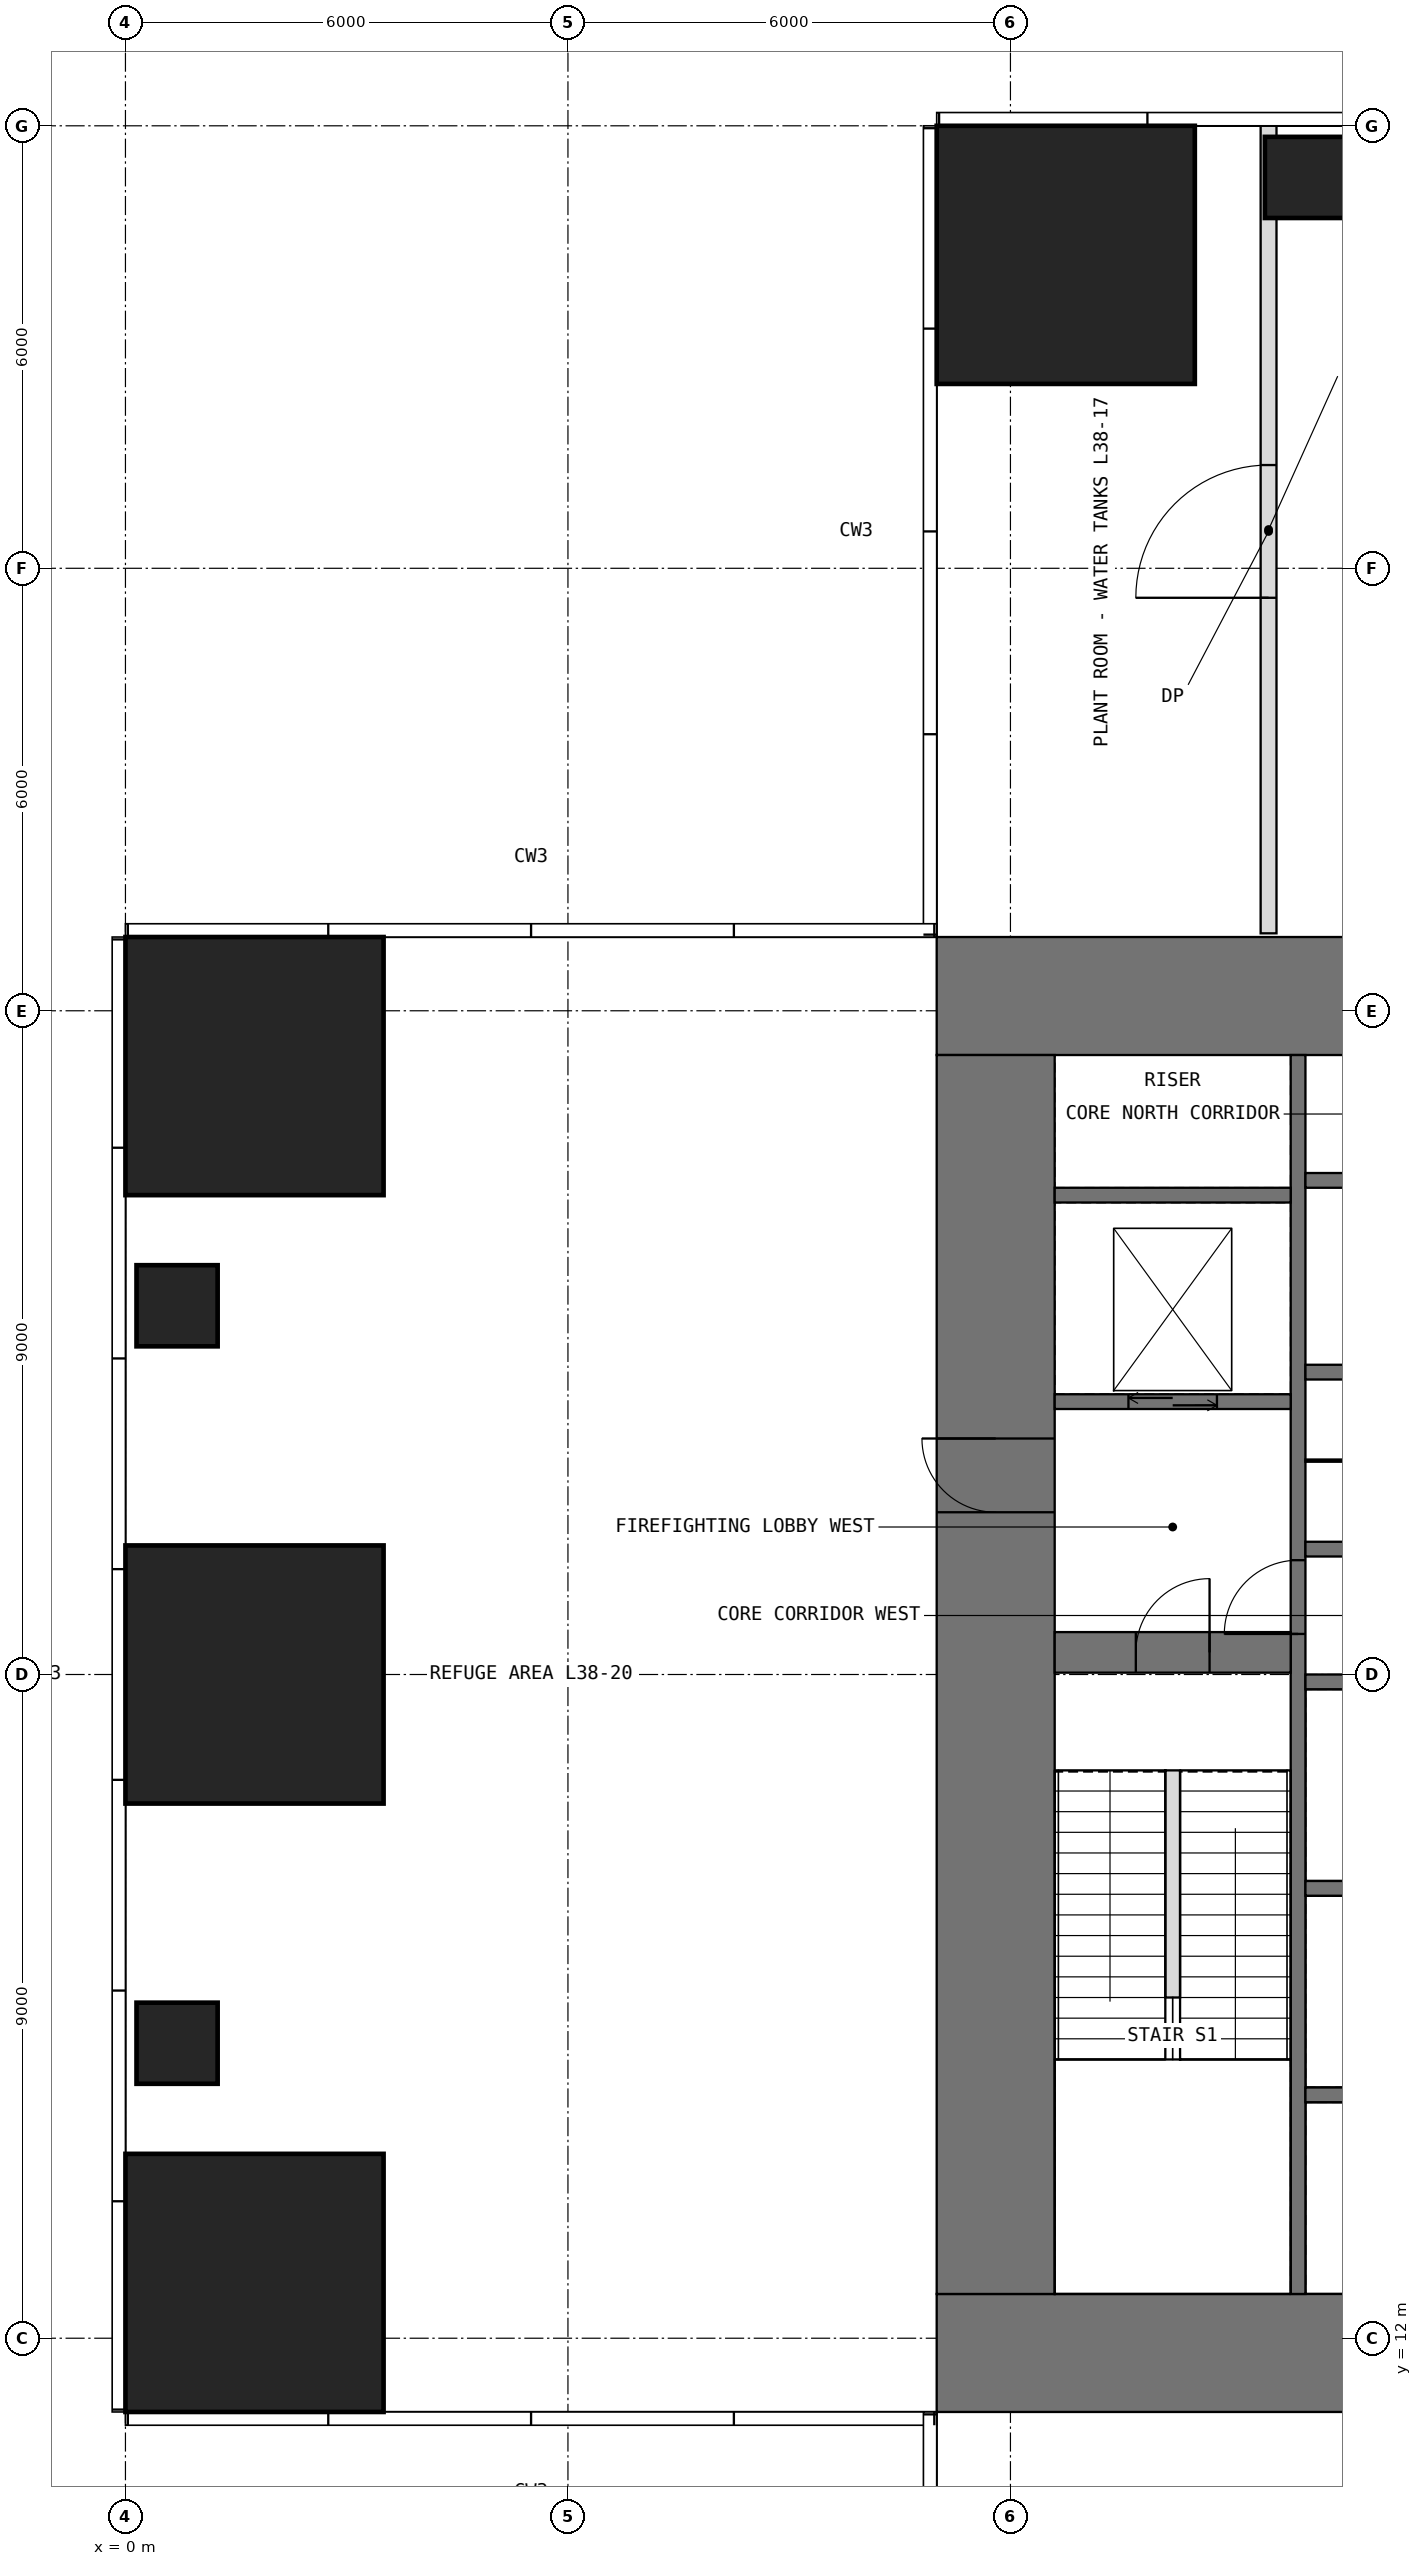
"""IFC4 building model, lengths in metres.
Left out: names, types, materials, properties, quantities, classifications, styles, units other than length and angle.
Written with IfcOpenShell. Run it as: python <this file> out.ifc"""

import sys

from ifc_helpers import new_model, si_unit, direction, frame, frame_2d, origin, origin_2d, place, context, subcontext, project, spatial, rectangle, extrude, element, fill, save


model = new_model("IFC4")
c1 = context("Model", 3, precision=1e-05, world=origin(), true_north=direction((0.0, 1.0)))
c2 = subcontext(c1, "Body", "Model", "MODEL_VIEW")
j1 = project(units=[si_unit("LENGTHUNIT", "METRE"), si_unit("PLANEANGLEUNIT", "RADIAN")], contexts=[c1])
p1 = place(None, origin())
s1 = spatial("IfcSite", under=j1, at=p1, CompositionType="ELEMENT")
p2 = place(p1, origin())
s2 = spatial("IfcBuilding", under=s1, at=p2, CompositionType="ELEMENT")
p3 = place(p2, frame((0.0, 0.0, 160.5)))
s3 = spatial("IfcBuildingStorey", under=s2, at=p3, CompositionType="ELEMENT", Elevation=160.5)
p4 = place(p3, frame((1.75, 12.75, 0.0), z_axis=(0.0, 0.0, 1.0), x_axis=(1.0, 0.0, 0.0)))
e1 = element("IfcColumn", 1, at=p4, inside=s3, PredefinedType="COLUMN", context=c2, shape_type="SweptSolid", body=[
    extrude(rectangle(XDim=3.5, YDim=3.5, at=origin_2d()), origin(), (0.0, 0.0, 1.0), 5.0),
])
p5 = place(p3, frame((0.7, 16.0, 0.0), z_axis=(0.0, 0.0, 1.0), x_axis=(1.0, 0.0, 0.0)))
e2 = element("IfcColumn", 2, at=p5, inside=s3, PredefinedType="COLUMN", context=c2, shape_type="SweptSolid", body=[
    extrude(rectangle(XDim=1.1, YDim=1.1, at=origin_2d()), origin(), (0.0, 0.0, 1.0), 5.0),
])
p6 = place(p3, frame((1.75, 21.0, 0.0), z_axis=(0.0, 0.0, 1.0), x_axis=(1.0, 0.0, 0.0)))
e3 = element("IfcColumn", 3, at=p6, inside=s3, PredefinedType="COLUMN", context=c2, shape_type="SweptSolid", body=[
    extrude(rectangle(XDim=3.5, YDim=3.5, at=origin_2d()), origin(), (0.0, 0.0, 1.0), 5.0),
])
p7 = place(p3, frame((0.7, 26.0, 0.0), z_axis=(0.0, 0.0, 1.0), x_axis=(1.0, 0.0, 0.0)))
e4 = element("IfcColumn", 4, at=p7, inside=s3, PredefinedType="COLUMN", context=c2, shape_type="SweptSolid", body=[
    extrude(rectangle(XDim=1.1, YDim=1.1, at=origin_2d()), origin(), (0.0, 0.0, 1.0), 5.0),
])
for number, where, z_axis, x_axis in (
    (5, (1.75, 29.25, 0.0), (0.0, 0.0, 1.0), (1.0, 0.0, 0.0)),
    (6, (12.75, 40.25, 0.0), (0.0, 0.0, 1.0), (1.0, 0.0, 0.0)),
):
    element("IfcColumn", number, at=place(p3, frame(where, z_axis=z_axis, x_axis=x_axis)), inside=s3, PredefinedType="COLUMN", context=c2, shape_type="SweptSolid", body=[
        extrude(rectangle(XDim=3.5, YDim=3.5, at=origin_2d()), origin(), (0.0, 0.0, 1.0), 5.0),
    ])
p8 = place(p3, frame((16.0, 41.3, 0.0), z_axis=(0.0, 0.0, 1.0), x_axis=(1.0, 0.0, 0.0)))
e7 = element("IfcColumn", 7, at=p8, inside=s3, PredefinedType="COLUMN", context=c2, shape_type="SweptSolid", body=[
    extrude(rectangle(XDim=1.1, YDim=1.1, at=origin_2d()), origin(), (0.0, 0.0, 1.0), 5.0),
])
p9 = place(p3, frame((11.0, 11.8, -0.25), z_axis=(0.0, 0.0, 1.0), x_axis=(1.0, 0.0, 0.0)))
e8 = element("IfcWall", 8, at=p9, inside=s3, PredefinedType="SHEAR", context=c2, shape_type="SweptSolid", body=[
    extrude(rectangle(XDim=20.0, YDim=1.6, at=frame_2d((10.0, 0.0))), origin(), (0.0, 0.0, 1.0), 5.2),
])
p10 = place(p9, frame((12.925, 0.0, 0.25)))
e9 = element("IfcOpeningElement", 9, at=p10, cuts=e8, PredefinedType="OPENING", context=c2, shape_type="SweptSolid", body=[
    extrude(rectangle(XDim=0.95, YDim=2.4, at=frame_2d((0.475, 1.2))), frame((0.0, 0.81, 0.0), z_axis=(0.0, -1.0, 0.0), x_axis=(1.0, 0.0, 0.0)), (0.0, 0.0, 1.0), 1.62),
])
p11 = place(p3, frame((11.0, 30.2, -0.25), z_axis=(0.0, 0.0, 1.0), x_axis=(1.0, 0.0, 0.0)))
e10 = element("IfcWall", 10, at=p11, inside=s3, PredefinedType="SHEAR", context=c2, shape_type="SweptSolid", body=[
    extrude(rectangle(XDim=20.0, YDim=1.6, at=frame_2d((10.0, 0.0))), origin(), (0.0, 0.0, 1.0), 5.2),
])
p12 = place(p11, frame((6.125, 0.0, 0.25)))
e11 = element("IfcOpeningElement", 11, at=p12, cuts=e10, PredefinedType="OPENING", context=c2, shape_type="SweptSolid", body=[
    extrude(rectangle(XDim=0.95, YDim=2.4, at=frame_2d((0.475, 1.2))), frame((0.0, 0.81, 0.0), z_axis=(0.0, -1.0, 0.0), x_axis=(1.0, 0.0, 0.0)), (0.0, 0.0, 1.0), 1.62),
])
p13 = place(p3, frame((11.8, 12.6, -0.25), z_axis=(0.0, 0.0, 1.0), x_axis=(0.0, 1.0, 0.0)))
e12 = element("IfcWall", 12, at=p13, inside=s3, PredefinedType="SHEAR", context=c2, shape_type="SweptSolid", body=[
    extrude(rectangle(XDim=16.8, YDim=1.6, at=frame_2d((8.4, 0.0))), origin(), (0.0, 0.0, 1.0), 5.2),
])
p14 = place(p13, frame((10.6, 0.0, 0.25)))
e13 = element("IfcOpeningElement", 13, at=p14, cuts=e12, PredefinedType="OPENING", context=c2, shape_type="SweptSolid", body=[
    extrude(rectangle(XDim=1.0, YDim=2.2, at=frame_2d((0.5, 1.1))), frame((0.0, 0.81, 0.0), z_axis=(0.0, -1.0, 0.0), x_axis=(1.0, 0.0, 0.0)), (0.0, 0.0, 1.0), 1.62),
])
p15 = place(p3, frame((15.9, 12.6, -0.25), z_axis=(0.0, 0.0, 1.0), x_axis=(0.0, 1.0, 0.0)))
e14 = element("IfcWall", 14, at=p15, inside=s3, PredefinedType="SHEAR", context=c2, shape_type="SweptSolid", body=[
    extrude(rectangle(XDim=16.8, YDim=0.2, at=frame_2d((8.4, 0.0))), origin(), (0.0, 0.0, 1.0), 5.2),
])
p16 = place(p15, frame((8.95, 0.0, 0.25)))
e15 = element("IfcOpeningElement", 15, at=p16, cuts=e14, PredefinedType="OPENING", context=c2, shape_type="SweptSolid", body=[
    extrude(rectangle(XDim=1.0, YDim=2.2, at=frame_2d((0.5, 1.1))), frame((0.0, 0.11, 0.0), z_axis=(0.0, -1.0, 0.0), x_axis=(1.0, 0.0, 0.0)), (0.0, 0.0, 1.0), 0.22),
])
p17 = place(p3, frame((12.6, 21.3, -0.25), z_axis=(0.0, 0.0, 1.0), x_axis=(1.0, 0.0, 0.0)))
e16 = element("IfcWall", 16, at=p17, inside=s3, PredefinedType="SHEAR", context=c2, shape_type="SweptSolid", body=[
    extrude(rectangle(XDim=3.2, YDim=0.55, at=frame_2d((1.6, 0.0))), origin(), (0.0, 0.0, 1.0), 5.2),
])
p18 = place(p17, frame((1.1, 0.0, 0.25)))
e17 = element("IfcOpeningElement", 17, at=p18, cuts=e16, PredefinedType="OPENING", context=c2, shape_type="SweptSolid", body=[
    extrude(rectangle(XDim=1.0, YDim=2.2, at=frame_2d((0.5, 1.1))), frame((0.0, 0.285, 0.0), z_axis=(0.0, -1.0, 0.0), x_axis=(1.0, 0.0, 0.0)), (0.0, 0.0, 1.0), 0.57),
])
p19 = place(p3, frame((12.6, 24.7, -0.25), z_axis=(0.0, 0.0, 1.0), x_axis=(1.0, 0.0, 0.0)))
e18 = element("IfcWall", 18, at=p19, inside=s3, PredefinedType="SHEAR", context=c2, shape_type="SweptSolid", body=[
    extrude(rectangle(XDim=3.2, YDim=0.2, at=frame_2d((1.6, 0.0))), origin(), (0.0, 0.0, 1.0), 5.2),
])
p20 = place(p19, frame((1.0, 0.0, 0.25)))
e19 = element("IfcOpeningElement", 19, at=p20, cuts=e18, PredefinedType="OPENING", context=c2, shape_type="SweptSolid", body=[
    extrude(rectangle(XDim=1.2, YDim=2.2, at=frame_2d((0.6, 1.1))), frame((0.0, 0.11, 0.0), z_axis=(0.0, -1.0, 0.0), x_axis=(1.0, 0.0, 0.0)), (0.0, 0.0, 1.0), 0.22),
])
for number, where, z_axis, x_axis in (
    (20, (12.6, 27.5, -0.25), (0.0, 0.0, 1.0), (1.0, 0.0, 0.0)),
    (21, (16.0, 15.3, -0.25), (0.0, 0.0, 1.0), (1.0, 0.0, 0.0)),
    (22, (16.0, 18.1, -0.25), (0.0, 0.0, 1.0), (1.0, 0.0, 0.0)),
    (23, (16.0, 20.9, -0.25), (0.0, 0.0, 1.0), (1.0, 0.0, 0.0)),
    (24, (16.0, 22.7, -0.25), (0.0, 0.0, 1.0), (1.0, 0.0, 0.0)),
    (25, (16.0, 25.1, -0.25), (0.0, 0.0, 1.0), (1.0, 0.0, 0.0)),
    (26, (16.0, 27.7, -0.25), (0.0, 0.0, 1.0), (1.0, 0.0, 0.0)),
):
    element("IfcWall", number, at=place(p3, frame(where, z_axis=z_axis, x_axis=x_axis)), inside=s3, PredefinedType="SHEAR", context=c2, shape_type="SweptSolid", body=[
        extrude(rectangle(XDim=3.2, YDim=0.2, at=frame_2d((1.6, 0.0))), origin(), (0.0, 0.0, 1.0), 5.2),
    ])
p21 = place(p3, frame((16.0, 23.9, 0.0), z_axis=(0.0, 0.0, 1.0), x_axis=(1.0, 0.0, 0.0)))
e27 = element("IfcWall", 27, at=p21, inside=s3, PredefinedType="PARTITIONING", context=c2, shape_type="SweptSolid", body=[
    extrude(rectangle(XDim=1.4, YDim=0.03, at=frame_2d((0.7, 0.0))), origin(), (0.0, 0.0, 1.0), 4.75),
])
p22 = place(p3, frame((15.5, 31.05, 0.0), z_axis=(0.0, 0.0, 1.0), x_axis=(0.0, 1.0, 0.0)))
e28 = element("IfcWall", 28, at=p22, inside=s3, PredefinedType="PARTITIONING", context=c2, shape_type="SweptSolid", body=[
    extrude(rectangle(XDim=10.95, YDim=0.215, at=frame_2d((5.475, 0.0))), origin(), (0.0, 0.0, 1.0), 4.75),
])
p23 = place(p22, frame((4.55, 0.0, 0.0)))
e29 = element("IfcOpeningElement", 29, at=p23, cuts=e28, PredefinedType="OPENING", context=c2, shape_type="SweptSolid", body=[
    extrude(rectangle(XDim=1.8, YDim=2.4, at=frame_2d((0.9, 1.2))), frame((0.0, 0.118, 0.0), z_axis=(0.0, -1.0, 0.0), x_axis=(1.0, 0.0, 0.0)), (0.0, 0.0, 1.0), 0.235),
])
p24 = place(p3, frame((14.2, 16.62, 0.0), z_axis=(0.0, 0.0, 1.0), x_axis=(0.0, 1.0, 0.0)))
e30 = element("IfcWall", 30, at=p24, inside=s3, PredefinedType="PARTITIONING", context=c2, shape_type="SweptSolid", body=[
    extrude(rectangle(XDim=3.08, YDim=0.2, at=frame_2d((1.54, 0.0))), origin(), (0.0, 0.0, 1.0), 5.0),
])
p25 = place(p14, origin())
e31 = element("IfcDoor", 31, at=p25, inside=s3, OperationType="SINGLE_SWING_RIGHT", PredefinedType="DOOR", context=c2, shape_type="SweptSolid", body=[
    extrude(rectangle(XDim=1.0, YDim=2.2, at=frame_2d((0.5, 1.1))), frame((0.0, 0.025, 0.0), z_axis=(0.0, -1.0, 0.0), x_axis=(1.0, 0.0, 0.0)), (0.0, 0.0, 1.0), 0.05),
])
fill(e13, e31)
p26 = place(p18, origin())
e32 = element("IfcDoor", 32, at=p26, inside=s3, OperationType="SINGLE_SWING_RIGHT", PredefinedType="DOOR", context=c2, shape_type="SweptSolid", body=[
    extrude(rectangle(XDim=1.0, YDim=2.2, at=frame_2d((0.5, 1.1))), frame((0.0, 0.025, 0.0), z_axis=(0.0, -1.0, 0.0), x_axis=(1.0, 0.0, 0.0)), (0.0, 0.0, 1.0), 0.05),
])
fill(e17, e32)
p27 = place(p16, origin())
e33 = element("IfcDoor", 33, at=p27, inside=s3, OperationType="SINGLE_SWING_LEFT", PredefinedType="DOOR", context=c2, shape_type="SweptSolid", body=[
    extrude(rectangle(XDim=1.0, YDim=2.2, at=frame_2d((0.5, 1.1))), frame((0.0, 0.025, 0.0), z_axis=(0.0, -1.0, 0.0), x_axis=(1.0, 0.0, 0.0)), (0.0, 0.0, 1.0), 0.05),
])
fill(e15, e33)
p28 = place(p23, origin())
e34 = element("IfcDoor", 34, at=p28, inside=s3, OperationType="DOUBLE_DOOR_SINGLE_SWING", PredefinedType="DOOR", context=c2, shape_type="SweptSolid", body=[
    extrude(rectangle(XDim=1.8, YDim=2.4, at=frame_2d((0.9, 1.2))), frame((0.0, 0.025, 0.0), z_axis=(0.0, -1.0, 0.0), x_axis=(1.0, 0.0, 0.0)), (0.0, 0.0, 1.0), 0.05),
])
fill(e29, e34)
p29 = place(p20, origin())
e35 = element("IfcDoor", 35, at=p29, inside=s3, OperationType="DOUBLE_DOOR_SLIDING", PredefinedType="DOOR", context=c2, shape_type="SweptSolid", body=[
    extrude(rectangle(XDim=1.2, YDim=2.2, at=frame_2d((0.6, 1.1))), frame((0.0, 0.025, 0.0), z_axis=(0.0, -1.0, 0.0), x_axis=(1.0, 0.0, 0.0)), (0.0, 0.0, 1.0), 0.05),
])
fill(e19, e35)
save(model, sys.argv[1])
